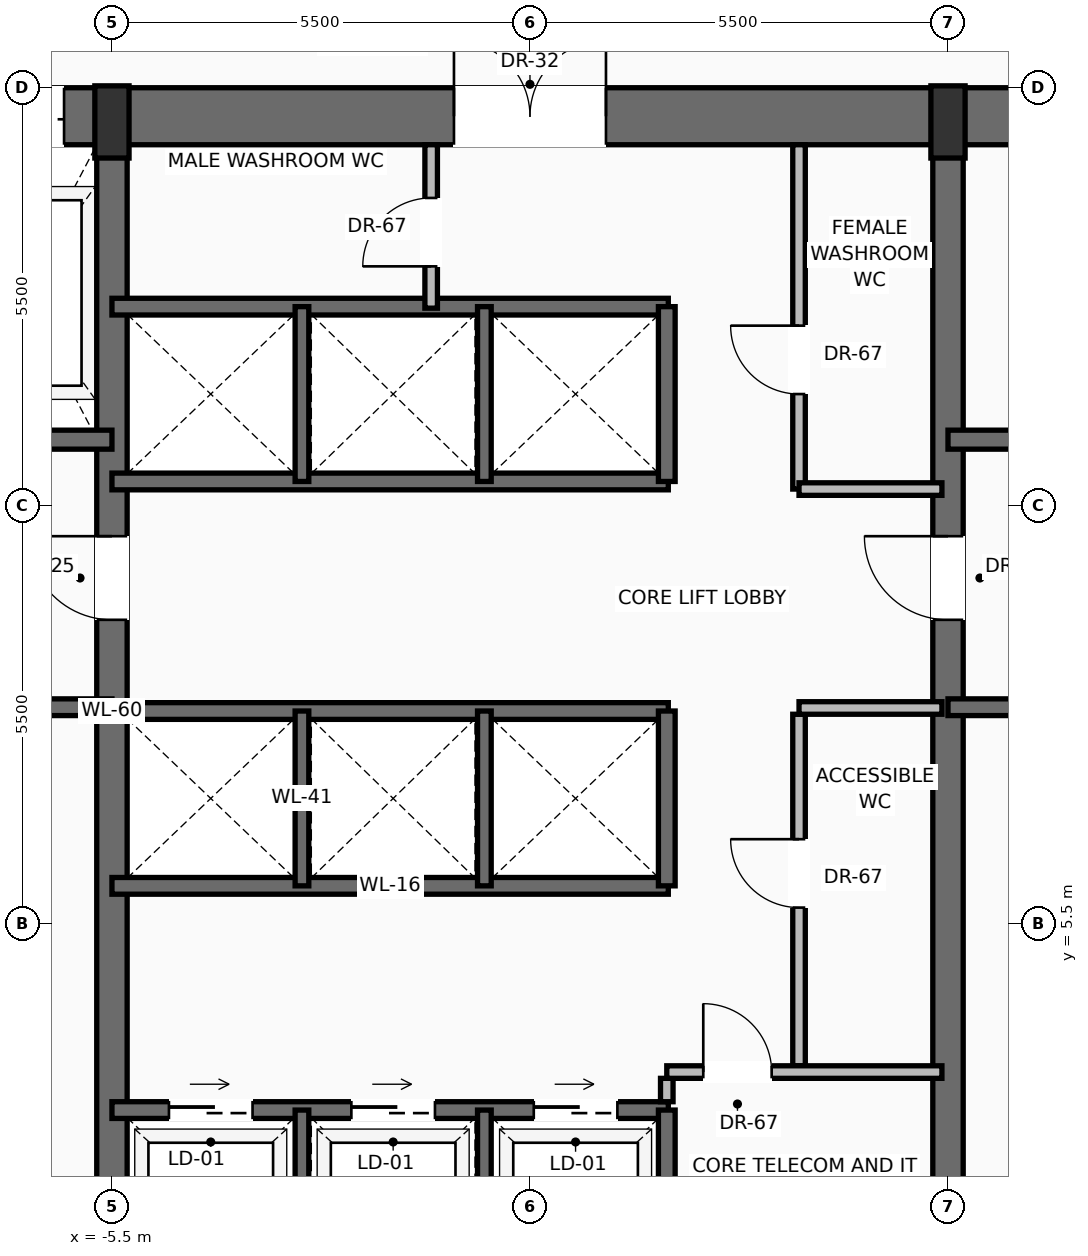
"""IFC4 building model, lengths in metres.
Left out: names, types, materials, properties, quantities, classifications, styles, units other than length and angle.
Written with IfcOpenShell. Run it as: python <this file> out.ifc"""

import sys

from ifc_helpers import new_model, si_unit, direction, frame, frame_2d, origin, origin_2d, place, context, subcontext, project, spatial, rectangle, extrude, source, transform, mapped, element, fill, save


model = new_model("IFC4")
c1 = context("Model", 3, precision=1e-05, world=origin(), true_north=direction((0.0, 1.0)))
c2 = subcontext(c1, "Body", "Model", "MODEL_VIEW")
j1 = project(units=[si_unit("LENGTHUNIT", "METRE"), si_unit("PLANEANGLEUNIT", "RADIAN")], contexts=[c1])
p1 = place(None, origin())
s1 = spatial("IfcSite", under=j1, at=p1, CompositionType="ELEMENT")
p2 = place(p1, origin())
s2 = spatial("IfcBuilding", under=s1, at=p2, CompositionType="ELEMENT")
p3 = place(p2, frame((0.0, 0.0, 76.6)))
s3 = spatial("IfcBuildingStorey", under=s2, at=p3, CompositionType="ELEMENT", Elevation=76.6)
p4 = place(p3, frame((-10.9, 16.125, 0.0), z_axis=(0.0, 0.0, 1.0), x_axis=(1.0, 0.0, 0.0)))
e1 = element("IfcWall", 1, at=p4, inside=s3, PredefinedType="SHEAR", context=c2, shape_type="SweptSolid", body=[
    extrude(rectangle(XDim=21.8, YDim=0.75, at=frame_2d((10.9, 0.0))), origin(), (0.0, 0.0, 1.0), 3.45),
])
p5 = place(p4, frame((3.47, 0.0, 0.0)))
e2 = element("IfcOpeningElement", 2, at=p5, cuts=e1, PredefinedType="OPENING", context=c2, shape_type="SweptSolid", body=[
    extrude(rectangle(XDim=1.3, YDim=2.3, at=frame_2d((0.65, 1.15))), frame((0.0, 0.385, 0.0), z_axis=(0.0, -1.0, 0.0), x_axis=(1.0, 0.0, 0.0)), (0.0, 0.0, 1.0), 0.77),
])
p6 = place(p4, frame((9.9, 0.0, 0.0)))
e3 = element("IfcOpeningElement", 3, at=p6, cuts=e1, PredefinedType="OPENING", context=c2, shape_type="SweptSolid", body=[
    extrude(rectangle(XDim=2.0, YDim=2.4, at=frame_2d((1.0, 1.2))), frame((0.0, 0.385, 0.0), z_axis=(0.0, -1.0, 0.0), x_axis=(1.0, 0.0, 0.0)), (0.0, 0.0, 1.0), 0.77),
])
p7 = place(p3, frame((-5.5, 0.475, 0.0), z_axis=(0.0, 0.0, 1.0), x_axis=(0.0, 1.0, 0.0)))
e4 = element("IfcWall", 4, at=p7, inside=s3, PredefinedType="SHEAR", context=c2, shape_type="SweptSolid", body=[
    extrude(rectangle(XDim=15.65, YDim=0.4, at=frame_2d((7.825, 0.0))), origin(), (0.0, 0.0, 1.0), 3.45),
])
p8 = place(p7, frame((9.025, 0.0, 0.0)))
e5 = element("IfcOpeningElement", 5, at=p8, cuts=e4, PredefinedType="OPENING", context=c2, shape_type="SweptSolid", body=[
    extrude(rectangle(XDim=1.1, YDim=2.2, at=frame_2d((0.55, 1.1))), frame((0.0, 0.21, 0.0), z_axis=(0.0, -1.0, 0.0), x_axis=(1.0, 0.0, 0.0)), (0.0, 0.0, 1.0), 0.42),
])
p9 = place(p3, frame((5.5, 0.475, 0.0), z_axis=(0.0, 0.0, 1.0), x_axis=(0.0, 1.0, 0.0)))
e6 = element("IfcWall", 6, at=p9, inside=s3, PredefinedType="SHEAR", context=c2, shape_type="SweptSolid", body=[
    extrude(rectangle(XDim=15.65, YDim=0.4, at=frame_2d((7.825, 0.0))), origin(), (0.0, 0.0, 1.0), 3.45),
])
p10 = place(p9, frame((9.025, 0.0, 0.0)))
e7 = element("IfcOpeningElement", 7, at=p10, cuts=e6, PredefinedType="OPENING", context=c2, shape_type="SweptSolid", body=[
    extrude(rectangle(XDim=1.1, YDim=2.2, at=frame_2d((0.55, 1.1))), frame((0.0, 0.21, 0.0), z_axis=(0.0, -1.0, 0.0), x_axis=(1.0, 0.0, 0.0)), (0.0, 0.0, 1.0), 0.42),
])
m1 = source(origin(), c2, "Body", "SweptSolid", [
    extrude(rectangle(XDim=0.45, YDim=0.95, at=origin_2d()), origin(), (0.0, 0.0, 1.0), 3.7),
])
for number, where, z_axis, x_axis in (
    (8, (-5.5, 16.05, 0.0), (0.0, 0.0, 1.0), (1.0, 0.0, 0.0)),
    (9, (5.5, 16.05, 0.0), (0.0, 0.0, 1.0), (1.0, 0.0, 0.0)),
):
    element("IfcColumn", number, at=place(p3, frame(where, z_axis=z_axis, x_axis=x_axis)), inside=s3, PredefinedType="PILASTER", context=c2, shape_type="MappedRepresentation", body=[
        mapped(m1, transform((0.0, 0.0, 0.0), scale=1.0)),
    ])
p11 = place(p3, frame((-5.5, 8.35, 0.0), z_axis=(0.0, 0.0, 1.0), x_axis=(-1.0, 0.0, 0.0)))
e10 = element("IfcWall", 10, at=p11, inside=s3, PredefinedType="SOLIDWALL", context=c2, shape_type="SweptSolid", body=[
    extrude(rectangle(XDim=4.65, YDim=0.22, at=frame_2d((2.325, 0.0))), origin(), (0.0, 0.0, 1.0), 3.45),
])
p12 = place(p11, frame((2.5, 0.0, 0.0)))
e11 = element("IfcOpeningElement", 11, at=p12, cuts=e10, PredefinedType="OPENING", context=c2, shape_type="SweptSolid", body=[
    extrude(rectangle(XDim=1.15, YDim=2.2, at=frame_2d((0.575, 1.1))), frame((0.0, 0.12, 0.0), z_axis=(0.0, -1.0, 0.0), x_axis=(1.0, 0.0, 0.0)), (0.0, 0.0, 1.0), 0.24),
])
p13 = place(p3, frame((-5.5, 11.87, 0.0), z_axis=(0.0, 0.0, 1.0), x_axis=(-1.0, 0.0, 0.0)))
e12 = element("IfcWall", 12, at=p13, inside=s3, PredefinedType="SOLIDWALL", context=c2, shape_type="SweptSolid", body=[
    extrude(rectangle(XDim=4.65, YDim=0.25, at=frame_2d((2.325, 0.0))), origin(), (0.0, 0.0, 1.0), 3.45),
])
p14 = place(p13, frame((2.95, 0.0, 0.0)))
e13 = element("IfcOpeningElement", 13, at=p14, cuts=e12, PredefinedType="OPENING", context=c2, shape_type="SweptSolid", body=[
    extrude(rectangle(XDim=1.2, YDim=2.25, at=frame_2d((0.6, 1.125))), frame((0.0, 0.135, 0.0), z_axis=(0.0, -1.0, 0.0), x_axis=(1.0, 0.0, 0.0)), (0.0, 0.0, 1.0), 0.27),
])
p15 = place(p3, frame((10.15, 8.35, 0.0), z_axis=(0.0, 0.0, 1.0), x_axis=(-1.0, 0.0, 0.0)))
e14 = element("IfcWall", 14, at=p15, inside=s3, PredefinedType="SOLIDWALL", context=c2, shape_type="SweptSolid", body=[
    extrude(rectangle(XDim=4.65, YDim=0.22, at=frame_2d((2.325, 0.0))), origin(), (0.0, 0.0, 1.0), 3.45),
])
p16 = place(p15, frame((1.0, 0.0, 0.0)))
e15 = element("IfcOpeningElement", 15, at=p16, cuts=e14, PredefinedType="OPENING", context=c2, shape_type="SweptSolid", body=[
    extrude(rectangle(XDim=1.15, YDim=2.2, at=frame_2d((0.575, 1.1))), frame((0.0, 0.12, 0.0), z_axis=(0.0, -1.0, 0.0), x_axis=(1.0, 0.0, 0.0)), (0.0, 0.0, 1.0), 0.24),
])
p17 = place(p3, frame((10.15, 11.87, 0.0), z_axis=(0.0, 0.0, 1.0), x_axis=(-1.0, 0.0, 0.0)))
e16 = element("IfcWall", 16, at=p17, inside=s3, PredefinedType="SOLIDWALL", context=c2, shape_type="SweptSolid", body=[
    extrude(rectangle(XDim=4.65, YDim=0.25, at=frame_2d((2.325, 0.0))), origin(), (0.0, 0.0, 1.0), 3.45),
])
p18 = place(p17, frame((0.5, 0.0, 0.0)))
e17 = element("IfcOpeningElement", 17, at=p18, cuts=e16, PredefinedType="OPENING", context=c2, shape_type="SweptSolid", body=[
    extrude(rectangle(XDim=1.2, YDim=2.25, at=frame_2d((0.6, 1.125))), frame((0.0, 0.135, 0.0), z_axis=(0.0, -1.0, 0.0), x_axis=(1.0, 0.0, 0.0)), (0.0, 0.0, 1.0), 0.27),
])
p19 = place(p3, frame((-5.5, 3.05, 0.0), z_axis=(0.0, 0.0, 1.0), x_axis=(1.0, 0.0, 0.0)))
e18 = element("IfcWall", 18, at=p19, inside=s3, PredefinedType="SOLIDWALL", context=c2, shape_type="SweptSolid", body=[
    extrude(rectangle(XDim=7.32, YDim=0.22, at=frame_2d((3.66, 0.0))), origin(), (0.0, 0.0, 1.0), 3.45),
])
p20 = place(p19, frame((0.75, 0.0, 0.0)))
e19 = element("IfcOpeningElement", 19, at=p20, cuts=e18, PredefinedType="OPENING", context=c2, shape_type="SweptSolid", body=[
    extrude(rectangle(XDim=1.1, YDim=2.2, at=frame_2d((0.55, 1.1))), frame((0.0, 0.12, 0.0), z_axis=(0.0, -1.0, 0.0), x_axis=(1.0, 0.0, 0.0)), (0.0, 0.0, 1.0), 0.24),
])
p21 = place(p19, frame((3.15, 0.0, 0.0)))
e20 = element("IfcOpeningElement", 20, at=p21, cuts=e18, PredefinedType="OPENING", context=c2, shape_type="SweptSolid", body=[
    extrude(rectangle(XDim=1.1, YDim=2.2, at=frame_2d((0.55, 1.1))), frame((0.0, 0.12, 0.0), z_axis=(0.0, -1.0, 0.0), x_axis=(1.0, 0.0, 0.0)), (0.0, 0.0, 1.0), 0.24),
])
p22 = place(p19, frame((5.55, 0.0, 0.0)))
e21 = element("IfcOpeningElement", 21, at=p22, cuts=e18, PredefinedType="OPENING", context=c2, shape_type="SweptSolid", body=[
    extrude(rectangle(XDim=1.1, YDim=2.2, at=frame_2d((0.55, 1.1))), frame((0.0, 0.12, 0.0), z_axis=(0.0, -1.0, 0.0), x_axis=(1.0, 0.0, 0.0)), (0.0, 0.0, 1.0), 0.24),
])
p23 = place(p3, frame((1.8, 0.85, 0.0), z_axis=(0.0, 0.0, 1.0), x_axis=(0.0, 1.0, 0.0)))
e22 = element("IfcWall", 22, at=p23, inside=s3, PredefinedType="SOLIDWALL", context=c2, shape_type="SweptSolid", body=[
    extrude(rectangle(XDim=2.2, YDim=0.22, at=frame_2d((1.1, 0.0))), origin(), (0.0, 0.0, 1.0), 3.45),
])
for number, where, z_axis, x_axis in (
    (23, (-3.0, 0.85, 0.0), (0.0, 0.0, 1.0), (0.0, 1.0, 0.0)),
    (24, (-0.6, 0.85, 0.0), (0.0, 0.0, 1.0), (0.0, 1.0, 0.0)),
):
    element("IfcWall", number, at=place(p3, frame(where, z_axis=z_axis, x_axis=x_axis)), inside=s3, PredefinedType="SOLIDWALL", context=c2, shape_type="SweptSolid", body=[
        extrude(rectangle(XDim=2.2, YDim=0.18, at=frame_2d((1.1, 0.0))), origin(), (0.0, 0.0, 1.0), 3.45),
    ])
p24 = place(p3, frame((1.8, 3.16, 0.0), z_axis=(0.0, 0.0, 1.0), x_axis=(0.0, 1.0, 0.0)))
e25 = element("IfcWall", 25, at=p24, inside=s3, PredefinedType="PARTITIONING", context=c2, shape_type="SweptSolid", body=[
    extrude(rectangle(XDim=0.308, YDim=0.165, at=frame_2d((0.154, 0.0))), origin(), (0.0, 0.0, 1.0), 3.442),
])
p25 = place(p3, frame((3.54, 3.633, 0.0), z_axis=(0.0, 0.0, 1.0), x_axis=(0.0, 1.0, 0.0)))
e26 = element("IfcWall", 26, at=p25, inside=s3, PredefinedType="PARTITIONING", context=c2, shape_type="SweptSolid", body=[
    extrude(rectangle(XDim=4.625, YDim=0.165, at=frame_2d((2.312, 0.0))), origin(), (0.0, 0.0, 1.0), 3.442),
])
p26 = place(p25, frame((2.081, 0.0, 0.0)))
e27 = element("IfcOpeningElement", 27, at=p26, cuts=e26, PredefinedType="OPENING", context=c2, shape_type="SweptSolid", body=[
    extrude(rectangle(XDim=0.9, YDim=2.1, at=frame_2d((0.45, 1.05))), frame((0.0, 0.093, 0.0), z_axis=(0.0, -1.0, 0.0), x_axis=(1.0, 0.0, 0.0)), (0.0, 0.0, 1.0), 0.185),
])
p27 = place(p3, frame((3.54, 8.34, 0.0), z_axis=(0.0, 0.0, 1.0), x_axis=(1.0, 0.0, 0.0)))
e28 = element("IfcWall", 28, at=p27, inside=s3, PredefinedType="PARTITIONING", context=c2, shape_type="SweptSolid", body=[
    extrude(rectangle(XDim=1.88, YDim=0.165, at=frame_2d((0.94, 0.0))), origin(), (0.0, 0.0, 1.0), 3.442),
])
p28 = place(p3, frame((1.8, 3.55, 0.0), z_axis=(0.0, 0.0, 1.0), x_axis=(1.0, 0.0, 0.0)))
e29 = element("IfcWall", 29, at=p28, inside=s3, PredefinedType="PARTITIONING", context=c2, shape_type="SweptSolid", body=[
    extrude(rectangle(XDim=3.62, YDim=0.165, at=frame_2d((1.81, 0.0))), origin(), (0.0, 0.0, 1.0), 3.442),
])
p29 = place(p28, frame((0.48, 0.0, 0.0)))
e30 = element("IfcOpeningElement", 30, at=p29, cuts=e29, PredefinedType="OPENING", context=c2, shape_type="SweptSolid", body=[
    extrude(rectangle(XDim=0.9, YDim=2.1, at=frame_2d((0.45, 1.05))), frame((0.0, 0.093, 0.0), z_axis=(0.0, -1.0, 0.0), x_axis=(1.0, 0.0, 0.0)), (0.0, 0.0, 1.0), 0.185),
])
for number, where, z_axis, x_axis in (
    (31, (-5.5, 6.0, 0.0), (0.0, 0.0, 1.0), (1.0, 0.0, 0.0)),
    (32, (-5.5, 8.3, 0.0), (0.0, 0.0, 1.0), (1.0, 0.0, 0.0)),
):
    element("IfcWall", number, at=place(p3, frame(where, z_axis=z_axis, x_axis=x_axis)), inside=s3, PredefinedType="SOLIDWALL", context=c2, shape_type="SweptSolid", body=[
        extrude(rectangle(XDim=7.32, YDim=0.22, at=frame_2d((3.66, 0.0))), origin(), (0.0, 0.0, 1.0), 3.45),
    ])
p30 = place(p3, frame((1.8, 6.0, 0.0), z_axis=(0.0, 0.0, 1.0), x_axis=(0.0, 1.0, 0.0)))
e33 = element("IfcWall", 33, at=p30, inside=s3, PredefinedType="SOLIDWALL", context=c2, shape_type="SweptSolid", body=[
    extrude(rectangle(XDim=2.3, YDim=0.22, at=frame_2d((1.15, 0.0))), origin(), (0.0, 0.0, 1.0), 3.45),
])
for number, where, z_axis, x_axis in (
    (34, (-3.0, 6.0, 0.0), (0.0, 0.0, 1.0), (0.0, 1.0, 0.0)),
    (35, (-0.6, 6.0, 0.0), (0.0, 0.0, 1.0), (0.0, 1.0, 0.0)),
):
    element("IfcWall", number, at=place(p3, frame(where, z_axis=z_axis, x_axis=x_axis)), inside=s3, PredefinedType="SOLIDWALL", context=c2, shape_type="SweptSolid", body=[
        extrude(rectangle(XDim=2.3, YDim=0.18, at=frame_2d((1.15, 0.0))), origin(), (0.0, 0.0, 1.0), 3.45),
    ])
for number, where, z_axis, x_axis in (
    (36, (-5.5, 11.32, 0.0), (0.0, 0.0, 1.0), (1.0, 0.0, 0.0)),
    (37, (-5.5, 13.62, 0.0), (0.0, 0.0, 1.0), (1.0, 0.0, 0.0)),
):
    element("IfcWall", number, at=place(p3, frame(where, z_axis=z_axis, x_axis=x_axis)), inside=s3, PredefinedType="SOLIDWALL", context=c2, shape_type="SweptSolid", body=[
        extrude(rectangle(XDim=7.32, YDim=0.22, at=frame_2d((3.66, 0.0))), origin(), (0.0, 0.0, 1.0), 3.45),
    ])
p31 = place(p3, frame((1.8, 11.32, 0.0), z_axis=(0.0, 0.0, 1.0), x_axis=(0.0, 1.0, 0.0)))
e38 = element("IfcWall", 38, at=p31, inside=s3, PredefinedType="SOLIDWALL", context=c2, shape_type="SweptSolid", body=[
    extrude(rectangle(XDim=2.3, YDim=0.22, at=frame_2d((1.15, 0.0))), origin(), (0.0, 0.0, 1.0), 3.45),
])
for number, where, z_axis, x_axis in (
    (39, (-3.0, 11.32, 0.0), (0.0, 0.0, 1.0), (0.0, 1.0, 0.0)),
    (40, (-0.6, 11.32, 0.0), (0.0, 0.0, 1.0), (0.0, 1.0, 0.0)),
):
    element("IfcWall", number, at=place(p3, frame(where, z_axis=z_axis, x_axis=x_axis)), inside=s3, PredefinedType="SOLIDWALL", context=c2, shape_type="SweptSolid", body=[
        extrude(rectangle(XDim=2.3, YDim=0.18, at=frame_2d((1.15, 0.0))), origin(), (0.0, 0.0, 1.0), 3.45),
    ])
p32 = place(p3, frame((-1.3, 13.6, 0.0), z_axis=(0.0, 0.0, 1.0), x_axis=(0.0, 1.0, 0.0)))
e41 = element("IfcWall", 41, at=p32, inside=s3, PredefinedType="PARTITIONING", context=c2, shape_type="SweptSolid", body=[
    extrude(rectangle(XDim=2.15, YDim=0.165, at=frame_2d((1.075, 0.0))), origin(), (0.0, 0.0, 1.0), 3.442),
])
p33 = place(p32, frame((0.55, 0.0, 0.0)))
e42 = element("IfcOpeningElement", 42, at=p33, cuts=e41, PredefinedType="OPENING", context=c2, shape_type="SweptSolid", body=[
    extrude(rectangle(XDim=0.9, YDim=2.1, at=frame_2d((0.45, 1.05))), frame((0.0, 0.093, 0.0), z_axis=(0.0, -1.0, 0.0), x_axis=(1.0, 0.0, 0.0)), (0.0, 0.0, 1.0), 0.185),
])
p34 = place(p3, frame((3.54, 11.22, 0.0), z_axis=(0.0, 0.0, 1.0), x_axis=(0.0, 1.0, 0.0)))
e43 = element("IfcWall", 43, at=p34, inside=s3, PredefinedType="PARTITIONING", context=c2, shape_type="SweptSolid", body=[
    extrude(rectangle(XDim=4.53, YDim=0.165, at=frame_2d((2.265, 0.0))), origin(), (0.0, 0.0, 1.0), 3.442),
])
p35 = place(p34, frame((1.25, 0.0, 0.0)))
e44 = element("IfcOpeningElement", 44, at=p35, cuts=e43, PredefinedType="OPENING", context=c2, shape_type="SweptSolid", body=[
    extrude(rectangle(XDim=0.9, YDim=2.1, at=frame_2d((0.45, 1.05))), frame((0.0, 0.093, 0.0), z_axis=(0.0, -1.0, 0.0), x_axis=(1.0, 0.0, 0.0)), (0.0, 0.0, 1.0), 0.185),
])
p36 = place(p3, frame((3.54, 11.22, 0.0), z_axis=(0.0, 0.0, 1.0), x_axis=(1.0, 0.0, 0.0)))
e45 = element("IfcWall", 45, at=p36, inside=s3, PredefinedType="PARTITIONING", context=c2, shape_type="SweptSolid", body=[
    extrude(rectangle(XDim=1.88, YDim=0.165, at=frame_2d((0.94, 0.0))), origin(), (0.0, 0.0, 1.0), 3.442),
])
m2 = source(origin(), c2, "Body", "SweptSolid", [
    extrude(rectangle(XDim=1.1, YDim=2.2, at=frame_2d((0.55, 1.1))), frame((0.0, 0.025, 0.0), z_axis=(0.0, -1.0, 0.0), x_axis=(1.0, 0.0, 0.0)), (0.0, 0.0, 1.0), 0.05),
])
p37 = place(p8, origin())
e46 = element("IfcDoor", 46, at=p37, inside=s3, OperationType="SINGLE_SWING_RIGHT", PredefinedType="DOOR", context=c2, shape_type="MappedRepresentation", body=[
    mapped(m2, transform((0.0, 0.0, 0.0), scale=1.0)),
])
fill(e5, e46)
m3 = source(origin(), c2, "Body", "SweptSolid", [
    extrude(rectangle(XDim=1.3, YDim=2.3, at=frame_2d((0.65, 1.15))), frame((0.0, 0.025, 0.0), z_axis=(0.0, -1.0, 0.0), x_axis=(1.0, 0.0, 0.0)), (0.0, 0.0, 1.0), 0.05),
])
p38 = place(p5, origin())
e47 = element("IfcDoor", 47, at=p38, inside=s3, OperationType="SLIDING_TO_RIGHT", PredefinedType="DOOR", context=c2, shape_type="MappedRepresentation", body=[
    mapped(m3, transform((0.0, 0.0, 0.0), scale=1.0)),
])
fill(e2, e47)
p39 = place(p10, origin())
e48 = element("IfcDoor", 48, at=p39, inside=s3, OperationType="SINGLE_SWING_RIGHT", PredefinedType="DOOR", context=c2, shape_type="MappedRepresentation", body=[
    mapped(m2, transform((0.0, 0.0, 0.0), scale=1.0)),
])
fill(e7, e48)
m4 = source(origin(), c2, "Body", "SweptSolid", [
    extrude(rectangle(XDim=2.0, YDim=2.4, at=frame_2d((1.0, 1.2))), frame((0.0, 0.025, 0.0), z_axis=(0.0, -1.0, 0.0), x_axis=(1.0, 0.0, 0.0)), (0.0, 0.0, 1.0), 0.05),
])
p40 = place(p6, origin())
e49 = element("IfcDoor", 49, at=p40, inside=s3, OperationType="DOUBLE_DOOR_SINGLE_SWING", PredefinedType="DOOR", context=c2, shape_type="MappedRepresentation", body=[
    mapped(m4, transform((0.0, 0.0, 0.0), scale=1.0)),
])
fill(e3, e49)
m5 = source(origin(), c2, "Body", "SweptSolid", [
    extrude(rectangle(XDim=1.1, YDim=2.2, at=frame_2d((0.55, 1.1))), frame((0.0, 0.025, 0.0), z_axis=(0.0, -1.0, 0.0), x_axis=(1.0, 0.0, 0.0)), (0.0, 0.0, 1.0), 0.05),
])
p41 = place(p20, origin())
e50 = element("IfcDoor", 50, at=p41, inside=s3, OperationType="SLIDING_TO_RIGHT", PredefinedType="DOOR", context=c2, shape_type="MappedRepresentation", body=[
    mapped(m5, transform((0.0, 0.0, 0.0), scale=1.0)),
])
fill(e19, e50)
p42 = place(p21, origin())
e51 = element("IfcDoor", 51, at=p42, inside=s3, OperationType="SLIDING_TO_RIGHT", PredefinedType="DOOR", context=c2, shape_type="MappedRepresentation", body=[
    mapped(m5, transform((0.0, 0.0, 0.0), scale=1.0)),
])
fill(e20, e51)
p43 = place(p22, origin())
e52 = element("IfcDoor", 52, at=p43, inside=s3, OperationType="SLIDING_TO_RIGHT", PredefinedType="DOOR", context=c2, shape_type="MappedRepresentation", body=[
    mapped(m5, transform((0.0, 0.0, 0.0), scale=1.0)),
])
fill(e21, e52)
m6 = source(origin(), c2, "Body", "SweptSolid", [
    extrude(rectangle(XDim=0.9, YDim=2.1, at=frame_2d((0.45, 1.05))), frame((0.0, 0.025, 0.0), z_axis=(0.0, -1.0, 0.0), x_axis=(1.0, 0.0, 0.0)), (0.0, 0.0, 1.0), 0.05),
])
p44 = place(p29, origin())
e53 = element("IfcDoor", 53, at=p44, inside=s3, OperationType="SINGLE_SWING_LEFT", PredefinedType="DOOR", context=c2, shape_type="MappedRepresentation", body=[
    mapped(m6, transform((0.0, 0.0, 0.0), scale=1.0)),
])
fill(e30, e53)
p45 = place(p26, origin())
e54 = element("IfcDoor", 54, at=p45, inside=s3, OperationType="SINGLE_SWING_RIGHT", PredefinedType="DOOR", context=c2, shape_type="MappedRepresentation", body=[
    mapped(m6, transform((0.0, 0.0, 0.0), scale=1.0)),
])
fill(e27, e54)
p46 = place(p33, origin())
e55 = element("IfcDoor", 55, at=p46, inside=s3, OperationType="SINGLE_SWING_LEFT", PredefinedType="DOOR", context=c2, shape_type="MappedRepresentation", body=[
    mapped(m6, transform((0.0, 0.0, 0.0), scale=1.0)),
])
fill(e42, e55)
p47 = place(p35, origin())
e56 = element("IfcDoor", 56, at=p47, inside=s3, OperationType="SINGLE_SWING_RIGHT", PredefinedType="DOOR", context=c2, shape_type="MappedRepresentation", body=[
    mapped(m6, transform((0.0, 0.0, 0.0), scale=1.0)),
])
fill(e44, e56)
save(model, sys.argv[1])
